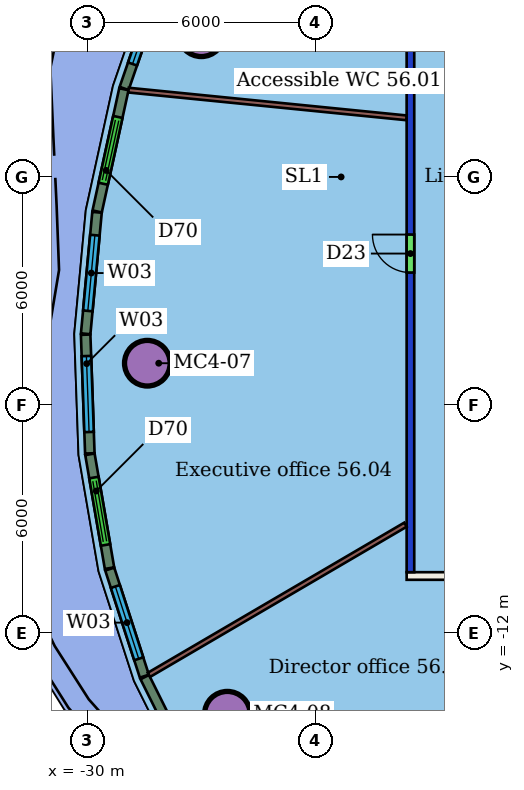
"""IFC4 building model, lengths in metres.
Left out: names, types, materials, properties, quantities, classifications, styles, units other than length and angle.
Written with IfcOpenShell. Run it as: python <this file> out.ifc"""

import sys

from ifc_helpers import new_model, si_unit, direction, frame, frame_2d, origin, origin_2d, place, context, subcontext, project, spatial, rectangle, hollow_circle, extrude, element, fill, save


model = new_model("IFC4")
c1 = context("Model", 3, precision=1e-05, world=origin(), true_north=direction((0.0, 1.0)))
c2 = subcontext(c1, "Body", "Model", "MODEL_VIEW")
j1 = project(units=[si_unit("LENGTHUNIT", "METRE"), si_unit("PLANEANGLEUNIT", "RADIAN")], contexts=[c1])
p1 = place(None, origin())
s1 = spatial("IfcSite", under=j1, at=p1, CompositionType="ELEMENT")
p2 = place(p1, origin())
s2 = spatial("IfcBuilding", under=s1, at=p2, CompositionType="ELEMENT")
p3 = place(p2, frame((0.0, 0.0, 228.1)))
s3 = spatial("IfcBuildingStorey", under=s2, at=p3, CompositionType="ELEMENT", Elevation=228.1)
for number, where, z_axis, x_axis in (
    (1, (-27.003, 3.768, 0.0), (0.0, 0.0, 1.0), (1.0, 0.0, 0.0)),
    (2, (-28.424, -4.901, 0.0), (0.0, 0.0, 1.0), (1.0, 0.0, 0.0)),
    (3, (-26.318, -14.137, 0.0), (0.0, 0.0, 1.0), (1.0, 0.0, 0.0)),
):
    element("IfcColumn", number, at=place(p3, frame(where, z_axis=z_axis, x_axis=x_axis)), inside=s3, PredefinedType="COLUMN", context=c2, shape_type="SweptSolid", body=[
        extrude(hollow_circle(Radius=0.6, WallThickness=0.045, at=origin_2d()), origin(), (0.0, 0.0, 1.0), 3.45),
    ])
p4 = place(p3, frame((9.6, -10.5, 0.0), z_axis=(0.0, 0.0, 1.0), x_axis=(-1.0, 0.0, 0.0)))
e4 = element("IfcWall", 4, at=p4, inside=s3, PredefinedType="PARTITIONING", context=c2, shape_type="SweptSolid", body=[
    extrude(rectangle(XDim=31.2, YDim=0.2, at=frame_2d((15.6, 0.0))), origin(), (0.0, 0.0, 1.0), 3.45),
])
p5 = place(p4, frame((26.604, 0.0, 0.0)))
e5 = element("IfcOpeningElement", 5, at=p5, cuts=e4, PredefinedType="OPENING", context=c2, shape_type="SweptSolid", body=[
    extrude(rectangle(XDim=1.0, YDim=2.4, at=frame_2d((0.5, 1.2))), frame((0.0, 0.11, 0.0), z_axis=(0.0, -1.0, 0.0), x_axis=(1.0, 0.0, 0.0)), (0.0, 0.0, 1.0), 0.22),
])
p6 = place(p4, frame((20.195, 0.0, 0.0)))
e6 = element("IfcOpeningElement", 6, at=p6, cuts=e4, PredefinedType="OPENING", context=c2, shape_type="SweptSolid", body=[
    extrude(rectangle(XDim=1.5, YDim=2.1, at=frame_2d((0.75, 1.05))), frame((0.0, 0.11, 0.0), z_axis=(0.0, -1.0, 0.0), x_axis=(1.0, 0.0, 0.0)), (0.0, 0.0, 1.0), 0.22),
])
p7 = place(p4, frame((16.532, 0.0, 0.0)))
e7 = element("IfcOpeningElement", 7, at=p7, cuts=e4, PredefinedType="OPENING", context=c2, shape_type="SweptSolid", body=[
    extrude(rectangle(XDim=1.0, YDim=2.4, at=frame_2d((0.5, 1.2))), frame((0.0, 0.11, 0.0), z_axis=(0.0, -1.0, 0.0), x_axis=(1.0, 0.0, 0.0)), (0.0, 0.0, 1.0), 0.22),
])
p8 = place(p4, frame((10.772, 0.0, 0.0)))
e8 = element("IfcOpeningElement", 8, at=p8, cuts=e4, PredefinedType="OPENING", context=c2, shape_type="SweptSolid", body=[
    extrude(rectangle(XDim=0.9, YDim=2.1, at=frame_2d((0.45, 1.05))), frame((0.0, 0.11, 0.0), z_axis=(0.0, -1.0, 0.0), x_axis=(1.0, 0.0, 0.0)), (0.0, 0.0, 1.0), 0.22),
])
p9 = place(p4, frame((6.524, 0.0, 0.0)))
e9 = element("IfcOpeningElement", 9, at=p9, cuts=e4, PredefinedType="OPENING", context=c2, shape_type="SweptSolid", body=[
    extrude(rectangle(XDim=1.2, YDim=2.4, at=frame_2d((0.6, 1.2))), frame((0.0, 0.11, 0.0), z_axis=(0.0, -1.0, 0.0), x_axis=(1.0, 0.0, 0.0)), (0.0, 0.0, 1.0), 0.22),
])
p10 = place(p3, frame((-21.5, -10.4, 0.0), z_axis=(0.0, 0.0, 1.0), x_axis=(0.0, 1.0, 0.0)))
e10 = element("IfcWall", 10, at=p10, inside=s3, PredefinedType="PARTITIONING", context=c2, shape_type="SweptSolid", body=[
    extrude(rectangle(XDim=20.8, YDim=0.2, at=frame_2d((10.4, 0.0))), origin(), (0.0, 0.0, 1.0), 3.05),
])
p11 = place(p10, frame((14.597, 0.0, 0.0)))
e11 = element("IfcOpeningElement", 11, at=p11, cuts=e10, PredefinedType="OPENING", context=c2, shape_type="SweptSolid", body=[
    extrude(rectangle(XDim=1.0, YDim=2.4, at=frame_2d((0.5, 1.2))), frame((0.0, 0.11, 0.0), z_axis=(0.0, -1.0, 0.0), x_axis=(1.0, 0.0, 0.0)), (0.0, 0.0, 1.0), 0.22),
])
p12 = place(p10, frame((7.884, 0.0, 0.0)))
e12 = element("IfcOpeningElement", 12, at=p12, cuts=e10, PredefinedType="OPENING", context=c2, shape_type="SweptSolid", body=[
    extrude(rectangle(XDim=1.0, YDim=2.4, at=frame_2d((0.5, 1.2))), frame((0.0, 0.11, 0.0), z_axis=(0.0, -1.0, 0.0), x_axis=(1.0, 0.0, 0.0)), (0.0, 0.0, 1.0), 0.22),
])
p13 = place(p3, frame((-28.918, 2.284, 0.0), z_axis=(0.0, 0.0, 1.0), x_axis=(0.995066424933, -0.099210936754, 0.0)))
e13 = element("IfcWall", 13, at=p13, inside=s3, PredefinedType="PARTITIONING", context=c2, shape_type="SweptSolid", body=[
    extrude(rectangle(XDim=7.348, YDim=0.125, at=frame_2d((3.674, 0.0))), origin(), (0.0, 0.0, 1.0), 3.45),
])
p14 = place(p3, frame((-28.382, -13.102, 0.0), z_axis=(0.0, 0.0, 1.0), x_axis=(0.863003515908, 0.505197913229, 0.0)))
e14 = element("IfcWall", 14, at=p14, inside=s3, PredefinedType="PARTITIONING", context=c2, shape_type="SweptSolid", body=[
    extrude(rectangle(XDim=7.822, YDim=0.125, at=frame_2d((3.911, 0.0))), origin(), (0.0, 0.0, 1.0), 3.45),
])
p15 = place(p3, frame((-23.457, -20.054, 0.0), z_axis=(0.0, 0.0, 1.0), x_axis=(0.656578688223, 0.754257533056, 0.0)))
e15 = element("IfcWall", 15, at=p15, inside=s3, PredefinedType="PARTITIONING", context=c2, shape_type="SweptSolid", body=[
    extrude(rectangle(XDim=12.479, YDim=0.125, at=frame_2d((6.24, 0.0))), origin(), (0.0, 0.0, 1.0), 3.45),
])
p16 = place(p3, frame((-27.938, 5.506, 0.0), z_axis=(0.0, 0.0, 1.0), x_axis=(-0.326124986631, -0.945326659465, 0.0)))
e16 = element("IfcWall", 16, at=p16, inside=s3, PredefinedType="SOLIDWALL", context=c2, shape_type="SweptSolid", body=[
    extrude(rectangle(XDim=3.361, YDim=0.25, at=frame_2d((1.681, 0.0))), origin(), (0.0, 0.0, 1.0), 3.1),
])
p17 = place(p16, frame((0.681, 0.0, 0.9)))
e17 = element("IfcOpeningElement", 17, at=p17, cuts=e16, PredefinedType="OPENING", context=c2, shape_type="SweptSolid", body=[
    extrude(rectangle(XDim=2.0, YDim=2.1, at=frame_2d((1.0, 1.05))), frame((0.0, 0.135, 0.0), z_axis=(0.0, -1.0, 0.0), x_axis=(1.0, 0.0, 0.0)), (0.0, 0.0, 1.0), 0.27),
])
p18 = place(p3, frame((-29.041, 2.307, 0.0), z_axis=(0.0, 0.0, 1.0), x_axis=(-0.213732278163, -0.976892273115, 0.0)))
e18 = element("IfcWall", 18, at=p18, inside=s3, PredefinedType="SOLIDWALL", context=c2, shape_type="SweptSolid", body=[
    extrude(rectangle(XDim=3.291, YDim=0.25, at=frame_2d((1.646, 0.0))), origin(), (0.0, 0.0, 1.0), 3.1),
])
p19 = place(p18, frame((0.745, 0.0, 0.0)))
e19 = element("IfcOpeningElement", 19, at=p19, cuts=e18, PredefinedType="OPENING", context=c2, shape_type="SweptSolid", body=[
    extrude(rectangle(XDim=1.8, YDim=2.4, at=frame_2d((0.9, 1.2))), frame((0.0, 0.135, 0.0), z_axis=(0.0, -1.0, 0.0), x_axis=(1.0, 0.0, 0.0)), (0.0, 0.0, 1.0), 0.27),
])
p20 = place(p3, frame((-29.747, -0.931, 0.0), z_axis=(0.0, 0.0, 1.0), x_axis=(-0.093086270193, -0.995658046872, 0.0)))
e20 = element("IfcWall", 20, at=p20, inside=s3, PredefinedType="SOLIDWALL", context=c2, shape_type="SweptSolid", body=[
    extrude(rectangle(XDim=3.21, YDim=0.25, at=frame_2d((1.605, 0.0))), origin(), (0.0, 0.0, 1.0), 3.1),
])
p21 = place(p20, frame((0.605, 0.0, 0.9)))
e21 = element("IfcOpeningElement", 21, at=p21, cuts=e20, PredefinedType="OPENING", context=c2, shape_type="SweptSolid", body=[
    extrude(rectangle(XDim=2.0, YDim=2.1, at=frame_2d((1.0, 1.05))), frame((0.0, 0.135, 0.0), z_axis=(0.0, -1.0, 0.0), x_axis=(1.0, 0.0, 0.0)), (0.0, 0.0, 1.0), 0.27),
])
p22 = place(p3, frame((-30.047, -4.151, 0.0), z_axis=(0.0, 0.0, 1.0), x_axis=(0.035161980599, -0.999381626367, 0.0)))
e22 = element("IfcWall", 22, at=p22, inside=s3, PredefinedType="SOLIDWALL", context=c2, shape_type="SweptSolid", body=[
    extrude(rectangle(XDim=3.125, YDim=0.25, at=frame_2d((1.562, 0.0))), origin(), (0.0, 0.0, 1.0), 3.1),
])
p23 = place(p22, frame((0.562, 0.0, 0.9)))
e23 = element("IfcOpeningElement", 23, at=p23, cuts=e22, PredefinedType="OPENING", context=c2, shape_type="SweptSolid", body=[
    extrude(rectangle(XDim=2.0, YDim=2.1, at=frame_2d((1.0, 1.05))), frame((0.0, 0.135, 0.0), z_axis=(0.0, -1.0, 0.0), x_axis=(1.0, 0.0, 0.0)), (0.0, 0.0, 1.0), 0.27),
])
p24 = place(p3, frame((-29.934, -7.298, 0.0), z_axis=(0.0, 0.0, 1.0), x_axis=(0.169645994058, -0.985505066806, 0.0)))
e24 = element("IfcWall", 24, at=p24, inside=s3, PredefinedType="SOLIDWALL", context=c2, shape_type="SweptSolid", body=[
    extrude(rectangle(XDim=3.039, YDim=0.25, at=frame_2d((1.52, 0.0))), origin(), (0.0, 0.0, 1.0), 3.1),
])
p25 = place(p24, frame((0.62, 0.0, 0.0)))
e25 = element("IfcOpeningElement", 25, at=p25, cuts=e24, PredefinedType="OPENING", context=c2, shape_type="SweptSolid", body=[
    extrude(rectangle(XDim=1.8, YDim=2.4, at=frame_2d((0.9, 1.2))), frame((0.0, 0.135, 0.0), z_axis=(0.0, -1.0, 0.0), x_axis=(1.0, 0.0, 0.0)), (0.0, 0.0, 1.0), 0.27),
])
p26 = place(p3, frame((-29.413, -10.319, 0.0), z_axis=(0.0, 0.0, 1.0), x_axis=(0.307706130581, -0.951481443436, 0.0)))
e26 = element("IfcWall", 26, at=p26, inside=s3, PredefinedType="SOLIDWALL", context=c2, shape_type="SweptSolid", body=[
    extrude(rectangle(XDim=2.961, YDim=0.25, at=frame_2d((1.48, 0.0))), origin(), (0.0, 0.0, 1.0), 3.1),
])
p27 = place(p26, frame((0.48, 0.0, 0.9)))
e27 = element("IfcOpeningElement", 27, at=p27, cuts=e26, PredefinedType="OPENING", context=c2, shape_type="SweptSolid", body=[
    extrude(rectangle(XDim=2.0, YDim=2.1, at=frame_2d((1.0, 1.05))), frame((0.0, 0.135, 0.0), z_axis=(0.0, -1.0, 0.0), x_axis=(1.0, 0.0, 0.0)), (0.0, 0.0, 1.0), 0.27),
])
p28 = place(p3, frame((-28.491, -13.16, 0.0), z_axis=(0.0, 0.0, 1.0), x_axis=(0.445536061048, -0.895263993639, 0.0)))
e28 = element("IfcWall", 28, at=p28, inside=s3, PredefinedType="SOLIDWALL", context=c2, shape_type="SweptSolid", body=[
    extrude(rectangle(XDim=2.854, YDim=0.25, at=frame_2d((1.427, 0.0))), origin(), (0.0, 0.0, 1.0), 3.1),
])
p29 = place(p12, origin())
e29 = element("IfcDoor", 29, at=p29, inside=s3, OperationType="SINGLE_SWING_RIGHT", PredefinedType="DOOR", context=c2, shape_type="SweptSolid", body=[
    extrude(rectangle(XDim=1.0, YDim=2.4, at=frame_2d((0.5, 1.2))), frame((0.0, 0.025, 0.0), z_axis=(0.0, -1.0, 0.0), x_axis=(1.0, 0.0, 0.0)), (0.0, 0.0, 1.0), 0.05),
])
fill(e12, e29)
p30 = place(p17, origin())
e30 = element("IfcWindow", 30, at=p30, inside=s3, PartitioningType="SINGLE_PANEL", PredefinedType="WINDOW", context=c2, shape_type="SweptSolid", body=[
    extrude(rectangle(XDim=2.0, YDim=2.1, at=frame_2d((1.0, 1.05))), frame((0.0, 0.03, 0.0), z_axis=(0.0, -1.0, 0.0), x_axis=(1.0, 0.0, 0.0)), (0.0, 0.0, 1.0), 0.06),
])
fill(e17, e30)
p31 = place(p19, origin())
e31 = element("IfcDoor", 31, at=p31, inside=s3, OperationType="DOUBLE_DOOR_SLIDING", PredefinedType="DOOR", context=c2, shape_type="SweptSolid", body=[
    extrude(rectangle(XDim=1.8, YDim=2.4, at=frame_2d((0.9, 1.2))), frame((0.0, 0.025, 0.0), z_axis=(0.0, -1.0, 0.0), x_axis=(1.0, 0.0, 0.0)), (0.0, 0.0, 1.0), 0.05),
])
fill(e19, e31)
p32 = place(p21, origin())
e32 = element("IfcWindow", 32, at=p32, inside=s3, PartitioningType="SINGLE_PANEL", PredefinedType="WINDOW", context=c2, shape_type="SweptSolid", body=[
    extrude(rectangle(XDim=2.0, YDim=2.1, at=frame_2d((1.0, 1.05))), frame((0.0, 0.03, 0.0), z_axis=(0.0, -1.0, 0.0), x_axis=(1.0, 0.0, 0.0)), (0.0, 0.0, 1.0), 0.06),
])
fill(e21, e32)
p33 = place(p23, origin())
e33 = element("IfcWindow", 33, at=p33, inside=s3, PartitioningType="SINGLE_PANEL", PredefinedType="WINDOW", context=c2, shape_type="SweptSolid", body=[
    extrude(rectangle(XDim=2.0, YDim=2.1, at=frame_2d((1.0, 1.05))), frame((0.0, 0.03, 0.0), z_axis=(0.0, -1.0, 0.0), x_axis=(1.0, 0.0, 0.0)), (0.0, 0.0, 1.0), 0.06),
])
fill(e23, e33)
p34 = place(p25, origin())
e34 = element("IfcDoor", 34, at=p34, inside=s3, OperationType="DOUBLE_DOOR_SLIDING", PredefinedType="DOOR", context=c2, shape_type="SweptSolid", body=[
    extrude(rectangle(XDim=1.8, YDim=2.4, at=frame_2d((0.9, 1.2))), frame((0.0, 0.025, 0.0), z_axis=(0.0, -1.0, 0.0), x_axis=(1.0, 0.0, 0.0)), (0.0, 0.0, 1.0), 0.05),
])
fill(e25, e34)
p35 = place(p27, origin())
e35 = element("IfcWindow", 35, at=p35, inside=s3, PartitioningType="SINGLE_PANEL", PredefinedType="WINDOW", context=c2, shape_type="SweptSolid", body=[
    extrude(rectangle(XDim=2.0, YDim=2.1, at=frame_2d((1.0, 1.05))), frame((0.0, 0.03, 0.0), z_axis=(0.0, -1.0, 0.0), x_axis=(1.0, 0.0, 0.0)), (0.0, 0.0, 1.0), 0.06),
])
fill(e27, e35)
save(model, sys.argv[1])
